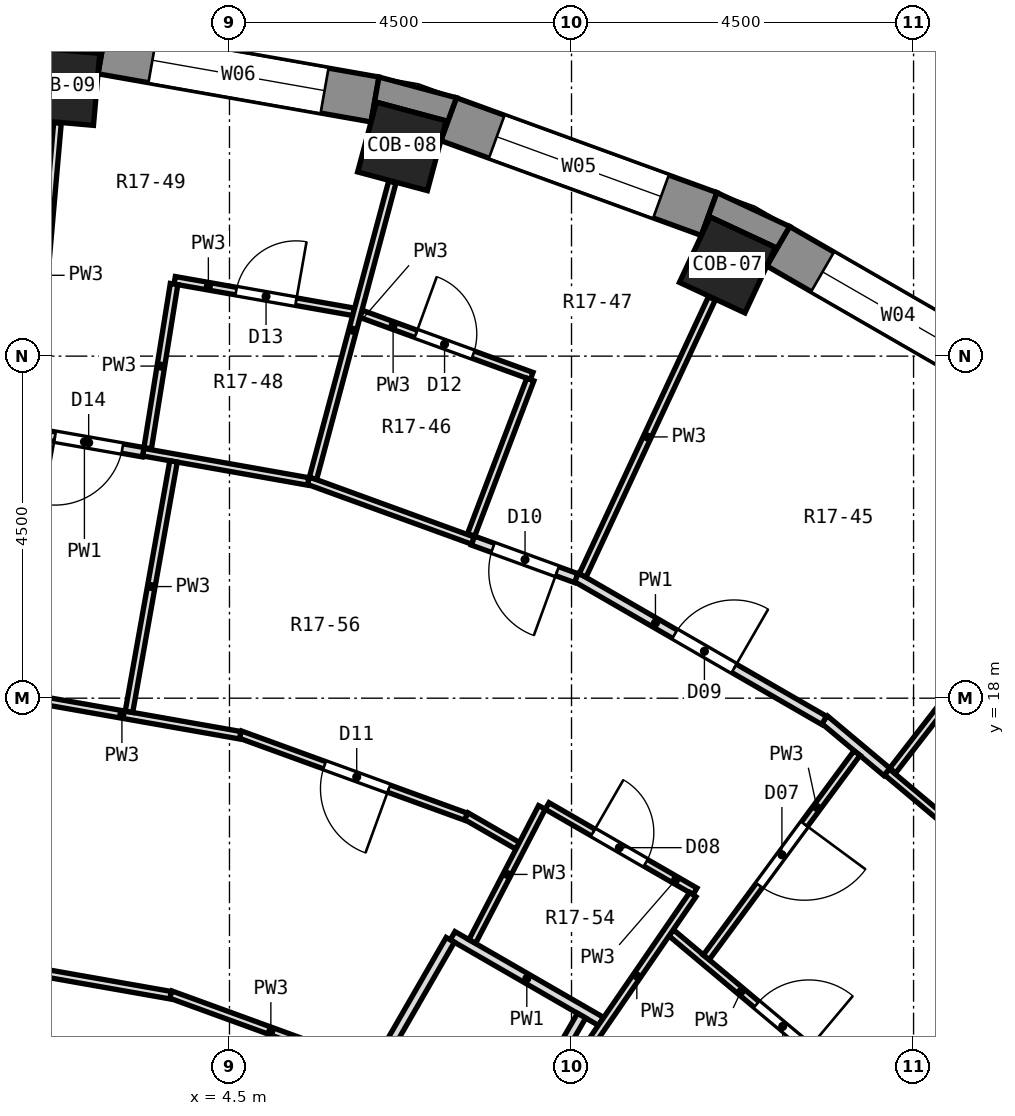
"""IFC4 building model, lengths in metres.
Left out: names, types, materials, properties, quantities, classifications, styles, units other than length and angle.
Written with IfcOpenShell. Run it as: python <this file> out.ifc"""

import sys

from ifc_helpers import new_model, si_unit, direction, frame, frame_2d, origin, origin_2d, place, context, subcontext, project, spatial, polyline, rectangle, outline, extrude, element, fill, save


model = new_model("IFC4")
c1 = context("Model", 3, precision=1e-05, world=origin(), true_north=direction((0.0, 1.0)))
c2 = subcontext(c1, "Body", "Model", "MODEL_VIEW")
j1 = project(units=[si_unit("LENGTHUNIT", "METRE"), si_unit("PLANEANGLEUNIT", "RADIAN")], contexts=[c1])
p1 = place(None, origin())
s1 = spatial("IfcSite", under=j1, at=p1, CompositionType="ELEMENT")
p2 = place(p1, origin())
s2 = spatial("IfcBuilding", under=s1, at=p2, CompositionType="ELEMENT")
p3 = place(p2, frame((0.0, 0.0, 91.9)))
s3 = spatial("IfcBuildingStorey", under=s2, at=p3, CompositionType="ELEMENT", Elevation=91.9)
for number, where, z_axis, x_axis in (
    (1, (11.052, 23.7, 0.0), (0.0, 0.0, 1.0), (0.423, 0.906, 0.0)),
    (2, (6.768, 25.259, 0.0), (0.0, 0.0, 1.0), (0.259, 0.966, 0.0)),
    (3, (2.279, 26.051, 0.0), (0.0, 0.0, 1.0), (0.087, 0.996, 0.0)),
):
    element("IfcColumn", number, at=place(p3, frame(where, z_axis=z_axis, x_axis=x_axis)), inside=s3, PredefinedType="COLUMN", context=c2, shape_type="SweptSolid", body=[
        extrude(rectangle(XDim=0.95, YDim=0.95, at=origin_2d()), origin(), (0.0, 0.0, 1.0), 3.3),
    ])
p4 = place(p3, frame((14.878, 22.122, 0.0), z_axis=(0.0, 0.0, 1.0), x_axis=(-0.866051847062, 0.499954196102, 0.0)))
e4 = element("IfcWall", 4, at=p4, inside=s3, PredefinedType="SOLIDWALL", context=c2, shape_type="SweptSolid", body=[
    extrude(rectangle(XDim=3.648, YDim=0.6, at=frame_2d((1.824, 0.0))), origin(), (0.0, 0.0, 1.0), 2.8),
])
p5 = place(p4, frame((0.674, 0.0, 0.9)))
e5 = element("IfcOpeningElement", 5, at=p5, cuts=e4, PredefinedType="OPENING", context=c2, shape_type="SweptSolid", body=[
    extrude(rectangle(XDim=2.3, YDim=1.8, at=frame_2d((1.15, 0.9))), frame((0.0, 0.312, 0.0), z_axis=(0.0, -1.0, 0.0), x_axis=(1.0, 0.0, 0.0)), (0.0, 0.0, 1.0), 0.624),
])
p6 = place(p3, frame((10.811, 24.369, 0.0), z_axis=(0.0, 0.0, 1.0), x_axis=(-0.939703505393, 0.341990236633, 0.0)))
e6 = element("IfcWall", 6, at=p6, inside=s3, PredefinedType="SOLIDWALL", context=c2, shape_type="SweptSolid", body=[
    extrude(rectangle(XDim=3.648, YDim=0.6, at=frame_2d((1.824, 0.0))), origin(), (0.0, 0.0, 1.0), 2.8),
])
p7 = place(p6, frame((0.674, 0.0, 0.9)))
e7 = element("IfcOpeningElement", 7, at=p7, cuts=e6, PredefinedType="OPENING", context=c2, shape_type="SweptSolid", body=[
    extrude(rectangle(XDim=2.3, YDim=1.8, at=frame_2d((1.15, 0.9))), frame((0.0, 0.312, 0.0), z_axis=(0.0, -1.0, 0.0), x_axis=(1.0, 0.0, 0.0)), (0.0, 0.0, 1.0), 0.624),
])
p8 = place(p3, frame((6.415, 25.876, 0.0), z_axis=(0.0, 0.0, 1.0), x_axis=(-0.984803764455, 0.173670796382, 0.0)))
e8 = element("IfcWall", 8, at=p8, inside=s3, PredefinedType="SOLIDWALL", context=c2, shape_type="SweptSolid", body=[
    extrude(rectangle(XDim=3.648, YDim=0.6, at=frame_2d((1.824, 0.0))), origin(), (0.0, 0.0, 1.0), 2.8),
])
p9 = place(p8, frame((0.674, 0.0, 0.9)))
e9 = element("IfcOpeningElement", 9, at=p9, cuts=e8, PredefinedType="OPENING", context=c2, shape_type="SweptSolid", body=[
    extrude(rectangle(XDim=2.3, YDim=1.8, at=frame_2d((1.15, 0.9))), frame((0.0, 0.312, 0.0), z_axis=(0.0, -1.0, 0.0), x_axis=(1.0, 0.0, 0.0)), (0.0, 0.0, 1.0), 0.624),
])
p10 = place(p3, origin())
e10 = element("IfcWall", 10, at=p10, inside=s3, PredefinedType="SOLIDWALL", context=c2, shape_type="SweptSolid", body=[
    extrude(outline(polyline([(10.913, 24.651), (10.708, 24.087), (10.822, 24.331), (11.683, 23.93), (11.569, 23.686), (11.869, 24.206), (10.913, 24.651)])), origin(), (0.0, 0.0, 1.0), 2.8),
])
p11 = place(p3, origin())
e11 = element("IfcWall", 11, at=p11, inside=s3, PredefinedType="SOLIDWALL", context=c2, shape_type="SweptSolid", body=[
    extrude(outline(polyline([(7.486, 25.899), (6.467, 26.172), (6.363, 25.581), (6.432, 25.841), (7.35, 25.595), (7.28, 25.335), (7.486, 25.899)])), origin(), (0.0, 0.0, 1.0), 2.8),
])
p12 = place(p3, origin())
e12 = element("IfcWall", 12, at=p12, inside=s3, PredefinedType="SOLIDWALL", context=c2, shape_type="SweptSolid", body=[
    extrude(outline(polyline([(2.875, 26.805), (1.824, 26.897), (1.824, 26.297), (1.847, 26.565), (2.794, 26.482), (2.77, 26.215), (2.875, 26.805)])), origin(), (0.0, 0.0, 1.0), 2.8),
])
p13 = place(p3, frame((10.311, 14.914, 0.0), z_axis=(0.0, 0.0, 1.0), x_axis=(0.766187913062, -0.642616590104, 0.0)))
e13 = element("IfcWall", 13, at=p13, inside=s3, PredefinedType="PARTITIONING", context=c2, shape_type="SweptSolid", body=[
    extrude(rectangle(XDim=3.205, YDim=0.1, at=frame_2d((1.602, 0.0))), origin(), (0.0, 0.0, 1.0), 2.8),
])
p14 = place(p13, frame((1.466, 0.0, 0.0)))
e14 = element("IfcOpeningElement", 14, at=p14, cuts=e13, PredefinedType="OPENING", context=c2, shape_type="SweptSolid", body=[
    extrude(rectangle(XDim=0.9, YDim=2.1, at=frame_2d((0.45, 1.05))), frame((0.0, 0.062, 0.0), z_axis=(0.0, -1.0, 0.0), x_axis=(1.0, 0.0, 0.0)), (0.0, 0.0, 1.0), 0.124),
])
p15 = place(p3, frame((13.149, 17.03, 0.0), z_axis=(0.0, 0.0, 1.0), x_axis=(0.766003631775, -0.642836243617, 0.0)))
e15 = element("IfcWall", 15, at=p15, inside=s3, PredefinedType="PARTITIONING", context=c2, shape_type="SweptSolid", body=[
    extrude(rectangle(XDim=2.704, YDim=0.1, at=frame_2d((1.352, 0.0))), origin(), (0.0, 0.0, 1.0), 2.8),
])
p16 = place(p3, frame((12.328, 17.718, 0.0), z_axis=(0.0, 0.0, 1.0), x_axis=(0.766311067441, -0.642469725292, 0.0)))
e16 = element("IfcWall", 16, at=p16, inside=s3, PredefinedType="PARTITIONING", context=c2, shape_type="SweptSolid", body=[
    extrude(rectangle(XDim=1.071, YDim=0.125, at=frame_2d((0.535, 0.0))), origin(), (0.0, 0.0, 1.0), 2.8),
])
p17 = place(p3, frame((7.436, 14.875, 0.0), z_axis=(0.0, 0.0, 1.0), x_axis=(0.866028691075, -0.499994306202, 0.0)))
e17 = element("IfcWall", 17, at=p17, inside=s3, PredefinedType="PARTITIONING", context=c2, shape_type="SweptSolid", body=[
    extrude(rectangle(XDim=2.254, YDim=0.125, at=frame_2d((1.127, 0.0))), origin(), (0.0, 0.0, 1.0), 2.8),
])
p18 = place(p3, frame((7.614, 16.449, 0.0), z_axis=(0.0, 0.0, 1.0), x_axis=(0.866201164306, -0.499695450205, 0.0)))
e18 = element("IfcWall", 18, at=p18, inside=s3, PredefinedType="PARTITIONING", context=c2, shape_type="SweptSolid", body=[
    extrude(rectangle(XDim=0.783, YDim=0.1, at=frame_2d((0.391, 0.0))), origin(), (0.0, 0.0, 1.0), 2.8),
])
p19 = place(p3, frame((8.679, 16.582, 0.0), z_axis=(0.0, 0.0, 1.0), x_axis=(0.866122264928, -0.499832194037, 0.0)))
e19 = element("IfcWall", 19, at=p19, inside=s3, PredefinedType="PARTITIONING", context=c2, shape_type="SweptSolid", body=[
    extrude(rectangle(XDim=2.247, YDim=0.1, at=frame_2d((1.124, 0.0))), origin(), (0.0, 0.0, 1.0), 2.8),
])
p20 = place(p19, frame((0.698, 0.0, 0.0)))
e20 = element("IfcOpeningElement", 20, at=p20, cuts=e19, PredefinedType="OPENING", context=c2, shape_type="SweptSolid", body=[
    extrude(rectangle(XDim=0.8, YDim=2.1, at=frame_2d((0.4, 1.05))), frame((0.0, 0.062, 0.0), z_axis=(0.0, -1.0, 0.0), x_axis=(1.0, 0.0, 0.0)), (0.0, 0.0, 1.0), 0.124),
])
p21 = place(p3, frame((9.065, 19.59, 0.0), z_axis=(0.0, 0.0, 1.0), x_axis=(0.865961876044, -0.500110017135, 0.0)))
e21 = element("IfcWall", 21, at=p21, inside=s3, PredefinedType="PARTITIONING", context=c2, shape_type="SweptSolid", body=[
    extrude(rectangle(XDim=3.762, YDim=0.125, at=frame_2d((1.881, 0.0))), origin(), (0.0, 0.0, 1.0), 2.8),
])
p22 = place(p21, frame((1.494, 0.0, 0.0)))
e22 = element("IfcOpeningElement", 22, at=p22, cuts=e21, PredefinedType="OPENING", context=c2, shape_type="SweptSolid", body=[
    extrude(rectangle(XDim=0.9, YDim=2.1, at=frame_2d((0.45, 1.05))), frame((0.0, 0.074, 0.0), z_axis=(0.0, -1.0, 0.0), x_axis=(1.0, 0.0, 0.0)), (0.0, 0.0, 1.0), 0.149),
])
p23 = place(p3, frame((3.726, 14.101, 0.0), z_axis=(0.0, 0.0, 1.0), x_axis=(0.939597715072, -0.342280782152, 0.0)))
e23 = element("IfcWall", 23, at=p23, inside=s3, PredefinedType="PARTITIONING", context=c2, shape_type="SweptSolid", body=[
    extrude(rectangle(XDim=2.807, YDim=0.1, at=frame_2d((1.403, 0.0))), origin(), (0.0, 0.0, 1.0), 2.8),
])
p24 = place(p3, frame((4.642, 17.521, 0.0), z_axis=(0.0, 0.0, 1.0), x_axis=(0.939739258447, -0.341891980211, 0.0)))
e24 = element("IfcWall", 24, at=p24, inside=s3, PredefinedType="PARTITIONING", context=c2, shape_type="SweptSolid", body=[
    extrude(rectangle(XDim=3.159, YDim=0.1, at=frame_2d((1.58, 0.0))), origin(), (0.0, 0.0, 1.0), 2.8),
])
p25 = place(p24, frame((1.18, 0.0, 0.0)))
e25 = element("IfcOpeningElement", 25, at=p25, cuts=e24, PredefinedType="OPENING", context=c2, shape_type="SweptSolid", body=[
    extrude(rectangle(XDim=0.9, YDim=2.1, at=frame_2d((0.45, 1.05))), frame((0.0, 0.062, 0.0), z_axis=(0.0, -1.0, 0.0), x_axis=(1.0, 0.0, 0.0)), (0.0, 0.0, 1.0), 0.124),
])
p26 = place(p3, frame((5.537, 20.861, 0.0), z_axis=(0.0, 0.0, 1.0), x_axis=(0.939734670151, -0.34190459154, 0.0)))
e26 = element("IfcWall", 26, at=p26, inside=s3, PredefinedType="PARTITIONING", context=c2, shape_type="SweptSolid", body=[
    extrude(rectangle(XDim=2.306, YDim=0.1, at=frame_2d((1.153, 0.0))), origin(), (0.0, 0.0, 1.0), 2.8),
])
p27 = place(p3, frame((7.704, 20.073, 0.0), z_axis=(0.0, 0.0, 1.0), x_axis=(0.939763804893, -0.341824503237, 0.0)))
e27 = element("IfcWall", 27, at=p27, inside=s3, PredefinedType="PARTITIONING", context=c2, shape_type="SweptSolid", body=[
    extrude(rectangle(XDim=1.444, YDim=0.125, at=frame_2d((0.722, 0.0))), origin(), (0.0, 0.0, 1.0), 2.8),
])
p28 = place(p27, frame((0.278, 0.0, 0.0)))
e28 = element("IfcOpeningElement", 28, at=p28, cuts=e27, PredefinedType="OPENING", context=c2, shape_type="SweptSolid", body=[
    extrude(rectangle(XDim=0.9, YDim=2.1, at=frame_2d((0.45, 1.05))), frame((0.0, 0.074, 0.0), z_axis=(0.0, -1.0, 0.0), x_axis=(1.0, 0.0, 0.0)), (0.0, 0.0, 1.0), 0.149),
])
p29 = place(p3, frame((6.23, 23.057, 0.0), z_axis=(0.0, 0.0, 1.0), x_axis=(0.939644231496, -0.342153062556, 0.0)))
e29 = element("IfcWall", 29, at=p29, inside=s3, PredefinedType="PARTITIONING", context=c2, shape_type="SweptSolid", body=[
    extrude(rectangle(XDim=2.39, YDim=0.1, at=frame_2d((1.195, 0.0))), origin(), (0.0, 0.0, 1.0), 2.8),
])
p30 = place(p29, frame((0.77, 0.0, 0.0)))
e30 = element("IfcOpeningElement", 30, at=p30, cuts=e29, PredefinedType="OPENING", context=c2, shape_type="SweptSolid", body=[
    extrude(rectangle(XDim=0.8, YDim=2.1, at=frame_2d((0.4, 1.05))), frame((0.0, 0.062, 0.0), z_axis=(0.0, -1.0, 0.0), x_axis=(1.0, 0.0, 0.0)), (0.0, 0.0, 1.0), 0.124),
])
p31 = place(p3, frame((3.365, 21.236, 0.0), z_axis=(0.0, 0.0, 1.0), x_axis=(0.98465059855, -0.174537098562, 0.0)))
e31 = element("IfcWall", 31, at=p31, inside=s3, PredefinedType="PARTITIONING", context=c2, shape_type="SweptSolid", body=[
    extrude(rectangle(XDim=2.205, YDim=0.1, at=frame_2d((1.102, 0.0))), origin(), (0.0, 0.0, 1.0), 2.8),
])
p32 = place(p3, frame((1.221, 14.534, 0.0), z_axis=(0.0, 0.0, 1.0), x_axis=(0.98484729526, -0.173423772937, 0.0)))
e32 = element("IfcWall", 32, at=p32, inside=s3, PredefinedType="PARTITIONING", context=c2, shape_type="SweptSolid", body=[
    extrude(rectangle(XDim=2.542, YDim=0.1, at=frame_2d((1.271, 0.0))), origin(), (0.0, 0.0, 1.0), 2.8),
])
p33 = place(p3, frame((1.529, 18.061, 0.0), z_axis=(0.0, 0.0, 1.0), x_axis=(0.984824759837, -0.173551699537, 0.0)))
e33 = element("IfcWall", 33, at=p33, inside=s3, PredefinedType="PARTITIONING", context=c2, shape_type="SweptSolid", body=[
    extrude(rectangle(XDim=3.159, YDim=0.1, at=frame_2d((1.58, 0.0))), origin(), (0.0, 0.0, 1.0), 2.8),
])
p34 = place(p3, frame((1.819, 21.508, 0.0), z_axis=(0.0, 0.0, 1.0), x_axis=(0.984825798369, -0.17354580625, 0.0)))
e34 = element("IfcWall", 34, at=p34, inside=s3, PredefinedType="PARTITIONING", context=c2, shape_type="SweptSolid", body=[
    extrude(rectangle(XDim=1.57, YDim=0.125, at=frame_2d((0.785, 0.0))), origin(), (0.0, 0.0, 1.0), 2.8),
])
p35 = place(p34, frame((0.392, 0.0, 0.0)))
e35 = element("IfcOpeningElement", 35, at=p35, cuts=e34, PredefinedType="OPENING", context=c2, shape_type="SweptSolid", body=[
    extrude(rectangle(XDim=0.9, YDim=2.1, at=frame_2d((0.45, 1.05))), frame((0.0, 0.074, 0.0), z_axis=(0.0, -1.0, 0.0), x_axis=(1.0, 0.0, 0.0)), (0.0, 0.0, 1.0), 0.149),
])
p36 = place(p3, frame((3.779, 23.498, 0.0), z_axis=(0.0, 0.0, 1.0), x_axis=(0.984802055472, -0.173680486922, 0.0)))
e36 = element("IfcWall", 36, at=p36, inside=s3, PredefinedType="PARTITIONING", context=c2, shape_type="SweptSolid", body=[
    extrude(rectangle(XDim=2.391, YDim=0.1, at=frame_2d((1.196, 0.0))), origin(), (0.0, 0.0, 1.0), 2.8),
])
p37 = place(p36, frame((0.821, 0.0, 0.0)))
e37 = element("IfcOpeningElement", 37, at=p37, cuts=e36, PredefinedType="OPENING", context=c2, shape_type="SweptSolid", body=[
    extrude(rectangle(XDim=0.8, YDim=2.1, at=frame_2d((0.4, 1.05))), frame((0.0, 0.062, 0.0), z_axis=(0.0, -1.0, 0.0), x_axis=(1.0, 0.0, 0.0)), (0.0, 0.0, 1.0), 0.124),
])
p38 = place(p3, frame((13.225, 17.047, 0.0), z_axis=(0.0, 0.0, 1.0), x_axis=(0.612827784587, 0.790216493398, 0.0)))
e38 = element("IfcWall", 38, at=p38, inside=s3, PredefinedType="PARTITIONING", context=c2, shape_type="SweptSolid", body=[
    extrude(rectangle(XDim=2.188, YDim=0.1, at=frame_2d((1.094, 0.0))), origin(), (0.0, 0.0, 1.0), 2.8),
])
p39 = place(p3, frame((10.773, 14.591, 0.0), z_axis=(0.0, 0.0, 1.0), x_axis=(0.593899624956, 0.804539144776, 0.0)))
e39 = element("IfcWall", 39, at=p39, inside=s3, PredefinedType="PARTITIONING", context=c2, shape_type="SweptSolid", body=[
    extrude(rectangle(XDim=3.339, YDim=0.1, at=frame_2d((1.669, 0.0))), origin(), (0.0, 0.0, 1.0), 2.8),
])
p40 = place(p39, frame((1.176, 0.0, 0.0)))
e40 = element("IfcOpeningElement", 40, at=p40, cuts=e39, PredefinedType="OPENING", context=c2, shape_type="SweptSolid", body=[
    extrude(rectangle(XDim=1.0, YDim=2.1, at=frame_2d((0.5, 1.05))), frame((0.0, 0.062, 0.0), z_axis=(0.0, -1.0, 0.0), x_axis=(1.0, 0.0, 0.0)), (0.0, 0.0, 1.0), 0.124),
])
p41 = place(p3, frame((9.122, 13.272, 0.0), z_axis=(0.0, 0.0, 1.0), x_axis=(0.566405338298, 0.82412680623, 0.0)))
e41 = element("IfcWall", 41, at=p41, inside=s3, PredefinedType="PARTITIONING", context=c2, shape_type="SweptSolid", body=[
    extrude(rectangle(XDim=2.601, YDim=0.1, at=frame_2d((1.301, 0.0))), origin(), (0.0, 0.0, 1.0), 2.8),
])
p42 = place(p3, frame((6.393, 9.075, 0.0), z_axis=(0.0, 0.0, 1.0), x_axis=(0.499717313028, 0.866188551679, 0.0)))
e42 = element("IfcWall", 42, at=p42, inside=s3, PredefinedType="PARTITIONING", context=c2, shape_type="SweptSolid", body=[
    extrude(rectangle(XDim=5.482, YDim=0.125, at=frame_2d((2.741, 0.0))), origin(), (0.0, 0.0, 1.0), 2.8),
])
p43 = place(p3, frame((4.666, 10.072, 0.0), z_axis=(0.0, 0.0, 1.0), x_axis=(0.499564368271, 0.866276769834, 0.0)))
e43 = element("IfcWall", 43, at=p43, inside=s3, PredefinedType="PARTITIONING", context=c2, shape_type="SweptSolid", body=[
    extrude(rectangle(XDim=5.482, YDim=0.125, at=frame_2d((2.741, 0.0))), origin(), (0.0, 0.0, 1.0), 2.8),
])
p44 = place(p3, frame((7.694, 14.8, 0.0), z_axis=(0.0, 0.0, 1.0), x_axis=(0.461012435149, 0.887393675117, 0.0)))
e44 = element("IfcWall", 44, at=p44, inside=s3, PredefinedType="PARTITIONING", context=c2, shape_type="SweptSolid", body=[
    extrude(rectangle(XDim=1.988, YDim=0.1, at=frame_2d((0.994, 0.0))), origin(), (0.0, 0.0, 1.0), 2.8),
])
p45 = place(p3, frame((9.146, 19.615, 0.0), z_axis=(0.0, 0.0, 1.0), x_axis=(0.422622950513, 0.906305600612, 0.0)))
e45 = element("IfcWall", 45, at=p45, inside=s3, PredefinedType="PARTITIONING", context=c2, shape_type="SweptSolid", body=[
    extrude(rectangle(XDim=4.022, YDim=0.1, at=frame_2d((2.011, 0.0))), origin(), (0.0, 0.0, 1.0), 2.8),
])
p46 = place(p3, frame((7.679, 20.149, 0.0), z_axis=(0.0, 0.0, 1.0), x_axis=(0.356134598474, 0.93443466747, 0.0)))
e46 = element("IfcWall", 46, at=p46, inside=s3, PredefinedType="PARTITIONING", context=c2, shape_type="SweptSolid", body=[
    extrude(rectangle(XDim=2.187, YDim=0.1, at=frame_2d((1.093, 0.0))), origin(), (0.0, 0.0, 1.0), 2.8),
])
p47 = place(p3, frame((5.599, 20.892, 0.0), z_axis=(0.0, 0.0, 1.0), x_axis=(0.258615129659, 0.965980442199, 0.0)))
e47 = element("IfcWall", 47, at=p47, inside=s3, PredefinedType="PARTITIONING", context=c2, shape_type="SweptSolid", body=[
    extrude(rectangle(XDim=4.036, YDim=0.1, at=frame_2d((2.018, 0.0))), origin(), (0.0, 0.0, 1.0), 2.8),
])
p48 = place(p3, frame((3.178, 17.821, 0.0), z_axis=(0.0, 0.0, 1.0), x_axis=(0.175313184309, 0.984512715716, 0.0)))
e48 = element("IfcWall", 48, at=p48, inside=s3, PredefinedType="PARTITIONING", context=c2, shape_type="SweptSolid", body=[
    extrude(rectangle(XDim=3.345, YDim=0.1, at=frame_2d((1.672, 0.0))), origin(), (0.0, 0.0, 1.0), 2.8),
])
p49 = place(p3, frame((3.424, 21.289, 0.0), z_axis=(0.0, 0.0, 1.0), x_axis=(0.1586042635, 0.987342234283, 0.0)))
e49 = element("IfcWall", 49, at=p49, inside=s3, PredefinedType="PARTITIONING", context=c2, shape_type="SweptSolid", body=[
    extrude(rectangle(XDim=2.187, YDim=0.1, at=frame_2d((1.094, 0.0))), origin(), (0.0, 0.0, 1.0), 2.8),
])
p50 = place(p3, frame((1.886, 21.559, 0.0), z_axis=(0.0, 0.0, 1.0), x_axis=(0.087137593131, 0.996196285811, 0.0)))
e50 = element("IfcWall", 50, at=p50, inside=s3, PredefinedType="PARTITIONING", context=c2, shape_type="SweptSolid", body=[
    extrude(rectangle(XDim=4.023, YDim=0.1, at=frame_2d((2.012, 0.0))), origin(), (0.0, 0.0, 1.0), 2.8),
])
p51 = place(p5, origin())
e51 = element("IfcWindow", 51, at=p51, inside=s3, PartitioningType="SINGLE_PANEL", PredefinedType="WINDOW", context=c2, shape_type="SweptSolid", body=[
    extrude(rectangle(XDim=2.3, YDim=1.8, at=frame_2d((1.15, 0.9))), frame((0.0, 0.18, 0.0), z_axis=(0.0, -1.0, 0.0), x_axis=(1.0, 0.0, 0.0)), (0.0, 0.0, 1.0), 0.06),
])
fill(e5, e51)
p52 = place(p7, origin())
e52 = element("IfcWindow", 52, at=p52, inside=s3, PartitioningType="SINGLE_PANEL", PredefinedType="WINDOW", context=c2, shape_type="SweptSolid", body=[
    extrude(rectangle(XDim=2.3, YDim=1.8, at=frame_2d((1.15, 0.9))), frame((0.0, 0.18, 0.0), z_axis=(0.0, -1.0, 0.0), x_axis=(1.0, 0.0, 0.0)), (0.0, 0.0, 1.0), 0.06),
])
fill(e7, e52)
p53 = place(p9, origin())
e53 = element("IfcWindow", 53, at=p53, inside=s3, PartitioningType="SINGLE_PANEL", PredefinedType="WINDOW", context=c2, shape_type="SweptSolid", body=[
    extrude(rectangle(XDim=2.3, YDim=1.8, at=frame_2d((1.15, 0.9))), frame((0.0, 0.18, 0.0), z_axis=(0.0, -1.0, 0.0), x_axis=(1.0, 0.0, 0.0)), (0.0, 0.0, 1.0), 0.06),
])
fill(e9, e53)
p54 = place(p14, origin())
e54 = element("IfcDoor", 54, at=p54, inside=s3, OperationType="SINGLE_SWING_RIGHT", PredefinedType="DOOR", context=c2, shape_type="SweptSolid", body=[
    extrude(rectangle(XDim=0.9, YDim=2.1, at=frame_2d((0.45, 1.05))), frame((0.0, 0.025, 0.0), z_axis=(0.0, -1.0, 0.0), x_axis=(1.0, 0.0, 0.0)), (0.0, 0.0, 1.0), 0.05),
])
fill(e14, e54)
p55 = place(p40, frame((1.0, 0.0, 0.0), z_axis=(0.0, 0.0, 1.0), x_axis=(-1.0, 0.0, 0.0)))
e55 = element("IfcDoor", 55, at=p55, inside=s3, OperationType="SINGLE_SWING_LEFT", PredefinedType="DOOR", context=c2, shape_type="SweptSolid", body=[
    extrude(rectangle(XDim=1.0, YDim=2.1, at=frame_2d((0.5, 1.05))), frame((0.0, 0.025, 0.0), z_axis=(0.0, -1.0, 0.0), x_axis=(1.0, 0.0, 0.0)), (0.0, 0.0, 1.0), 0.05),
])
fill(e40, e55)
p56 = place(p20, origin())
e56 = element("IfcDoor", 56, at=p56, inside=s3, OperationType="SINGLE_SWING_LEFT", PredefinedType="DOOR", context=c2, shape_type="SweptSolid", body=[
    extrude(rectangle(XDim=0.8, YDim=2.1, at=frame_2d((0.4, 1.05))), frame((0.0, 0.025, 0.0), z_axis=(0.0, -1.0, 0.0), x_axis=(1.0, 0.0, 0.0)), (0.0, 0.0, 1.0), 0.05),
])
fill(e20, e56)
p57 = place(p22, origin())
e57 = element("IfcDoor", 57, at=p57, inside=s3, OperationType="SINGLE_SWING_RIGHT", PredefinedType="DOOR", context=c2, shape_type="SweptSolid", body=[
    extrude(rectangle(XDim=0.9, YDim=2.1, at=frame_2d((0.45, 1.05))), frame((0.0, 0.025, 0.0), z_axis=(0.0, -1.0, 0.0), x_axis=(1.0, 0.0, 0.0)), (0.0, 0.0, 1.0), 0.05),
])
fill(e22, e57)
p58 = place(p28, frame((0.9, 0.0, 0.0), z_axis=(0.0, 0.0, 1.0), x_axis=(-1.0, 0.0, 0.0)))
e58 = element("IfcDoor", 58, at=p58, inside=s3, OperationType="SINGLE_SWING_LEFT", PredefinedType="DOOR", context=c2, shape_type="SweptSolid", body=[
    extrude(rectangle(XDim=0.9, YDim=2.1, at=frame_2d((0.45, 1.05))), frame((0.0, 0.025, 0.0), z_axis=(0.0, -1.0, 0.0), x_axis=(1.0, 0.0, 0.0)), (0.0, 0.0, 1.0), 0.05),
])
fill(e28, e58)
p59 = place(p25, frame((0.9, 0.0, 0.0), z_axis=(0.0, 0.0, 1.0), x_axis=(-1.0, 0.0, 0.0)))
e59 = element("IfcDoor", 59, at=p59, inside=s3, OperationType="SINGLE_SWING_LEFT", PredefinedType="DOOR", context=c2, shape_type="SweptSolid", body=[
    extrude(rectangle(XDim=0.9, YDim=2.1, at=frame_2d((0.45, 1.05))), frame((0.0, 0.025, 0.0), z_axis=(0.0, -1.0, 0.0), x_axis=(1.0, 0.0, 0.0)), (0.0, 0.0, 1.0), 0.05),
])
fill(e25, e59)
p60 = place(p30, origin())
e60 = element("IfcDoor", 60, at=p60, inside=s3, OperationType="SINGLE_SWING_LEFT", PredefinedType="DOOR", context=c2, shape_type="SweptSolid", body=[
    extrude(rectangle(XDim=0.8, YDim=2.1, at=frame_2d((0.4, 1.05))), frame((0.0, 0.025, 0.0), z_axis=(0.0, -1.0, 0.0), x_axis=(1.0, 0.0, 0.0)), (0.0, 0.0, 1.0), 0.05),
])
fill(e30, e60)
p61 = place(p37, origin())
e61 = element("IfcDoor", 61, at=p61, inside=s3, OperationType="SINGLE_SWING_RIGHT", PredefinedType="DOOR", context=c2, shape_type="SweptSolid", body=[
    extrude(rectangle(XDim=0.8, YDim=2.1, at=frame_2d((0.4, 1.05))), frame((0.0, 0.025, 0.0), z_axis=(0.0, -1.0, 0.0), x_axis=(1.0, 0.0, 0.0)), (0.0, 0.0, 1.0), 0.05),
])
fill(e37, e61)
p62 = place(p35, frame((0.9, 0.0, 0.0), z_axis=(0.0, 0.0, 1.0), x_axis=(-1.0, 0.0, 0.0)))
e62 = element("IfcDoor", 62, at=p62, inside=s3, OperationType="SINGLE_SWING_RIGHT", PredefinedType="DOOR", context=c2, shape_type="SweptSolid", body=[
    extrude(rectangle(XDim=0.9, YDim=2.1, at=frame_2d((0.45, 1.05))), frame((0.0, 0.025, 0.0), z_axis=(0.0, -1.0, 0.0), x_axis=(1.0, 0.0, 0.0)), (0.0, 0.0, 1.0), 0.05),
])
fill(e35, e62)
save(model, sys.argv[1])
